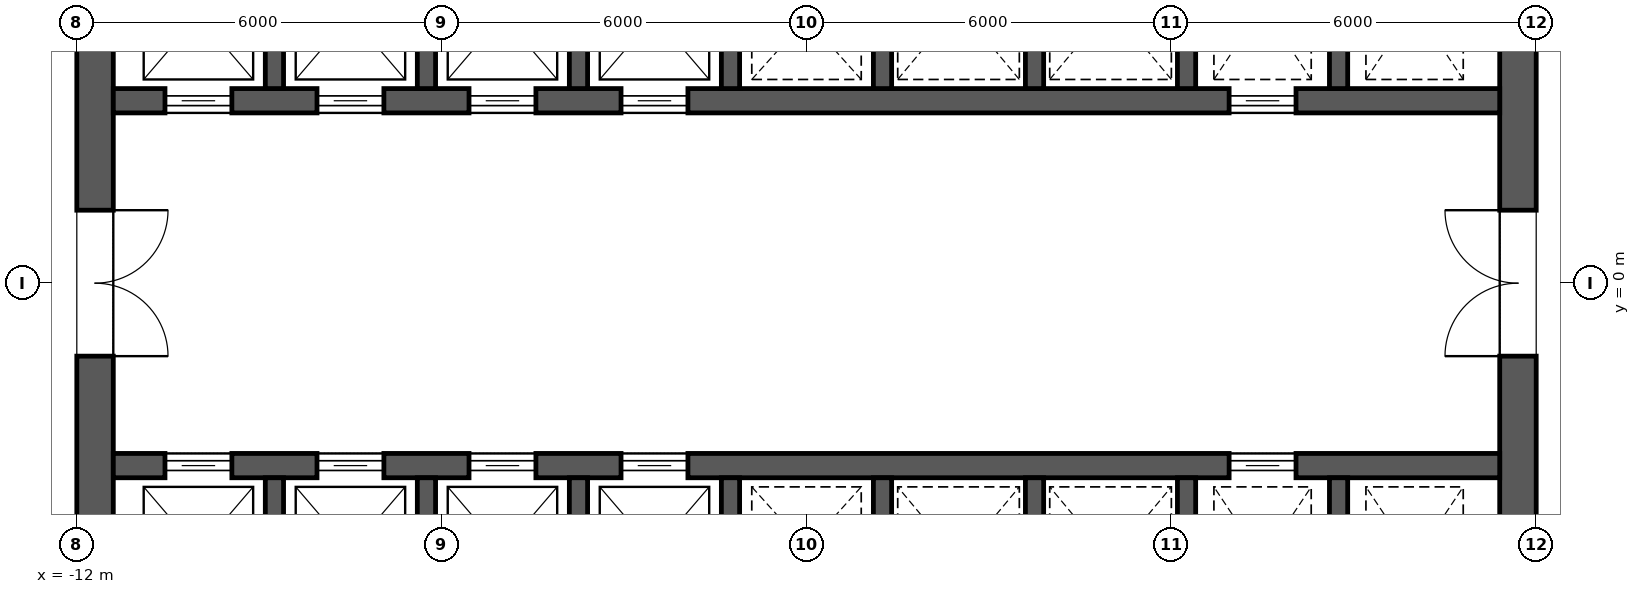
"""IFC4 building model, lengths in metres.
Left out: names, types, materials, properties, quantities, classifications, styles, units other than length and angle.
Written with IfcOpenShell. Run it as: python <this file> out.ifc"""

import sys

from ifc_helpers import new_model, si_unit, direction, frame, frame_2d, origin, place, context, subcontext, project, spatial, rectangle, extrude, element, fill, save


model = new_model("IFC4")
c1 = context("Model", 3, precision=1e-05, world=origin(), true_north=direction((0.0, 1.0)))
c2 = subcontext(c1, "Body", "Model", "MODEL_VIEW")
j1 = project(units=[si_unit("LENGTHUNIT", "METRE"), si_unit("PLANEANGLEUNIT", "RADIAN")], contexts=[c1])
p1 = place(None, origin())
s1 = spatial("IfcSite", under=j1, at=p1, CompositionType="ELEMENT")
p2 = place(p1, origin())
s2 = spatial("IfcBuilding", under=s1, at=p2, CompositionType="ELEMENT")
p3 = place(p2, frame((0.0, 0.0, 138.1)))
s3 = spatial("IfcBuildingStorey", under=s2, at=p3, CompositionType="ELEMENT", Elevation=138.1)
p4 = place(p3, frame((11.7, -11.4, 0.0), z_axis=(0.0, 0.0, 1.0), x_axis=(0.0, 1.0, 0.0)))
e1 = element("IfcWall", 1, at=p4, inside=s3, PredefinedType="SHEAR", context=c2, shape_type="SweptSolid", body=[
    extrude(rectangle(XDim=22.8, YDim=0.6, at=frame_2d((11.4, 0.0))), origin(), (0.0, 0.0, 1.0), 4.2),
])
p5 = place(p4, frame((10.2, 0.0, 0.0)))
e2 = element("IfcOpeningElement", 2, at=p5, cuts=e1, PredefinedType="OPENING", context=c2, shape_type="SweptSolid", body=[
    extrude(rectangle(XDim=2.4, YDim=2.1, at=frame_2d((1.2, 1.05))), frame((0.0, 0.312, 0.0), z_axis=(0.0, -1.0, 0.0), x_axis=(1.0, 0.0, 0.0)), (0.0, 0.0, 1.0), 0.624),
])
p6 = place(p4, frame((19.5, 0.0, 0.0)))
e3 = element("IfcOpeningElement", 3, at=p6, cuts=e1, PredefinedType="OPENING", context=c2, shape_type="SweptSolid", body=[
    extrude(rectangle(XDim=1.2, YDim=2.1, at=frame_2d((0.6, 1.05))), frame((0.0, 0.312, 0.0), z_axis=(0.0, -1.0, 0.0), x_axis=(1.0, 0.0, 0.0)), (0.0, 0.0, 1.0), 0.624),
])
p7 = place(p4, frame((2.1, 0.0, 0.0)))
e4 = element("IfcOpeningElement", 4, at=p7, cuts=e1, PredefinedType="OPENING", context=c2, shape_type="SweptSolid", body=[
    extrude(rectangle(XDim=1.2, YDim=2.1, at=frame_2d((0.6, 1.05))), frame((0.0, 0.312, 0.0), z_axis=(0.0, -1.0, 0.0), x_axis=(1.0, 0.0, 0.0)), (0.0, 0.0, 1.0), 0.624),
])
p8 = place(p3, frame((-11.7, -11.4, 0.0), z_axis=(0.0, 0.0, 1.0), x_axis=(0.0, 1.0, 0.0)))
e5 = element("IfcWall", 5, at=p8, inside=s3, PredefinedType="SHEAR", context=c2, shape_type="SweptSolid", body=[
    extrude(rectangle(XDim=22.8, YDim=0.6, at=frame_2d((11.4, 0.0))), origin(), (0.0, 0.0, 1.0), 4.2),
])
p9 = place(p8, frame((10.2, 0.0, 0.0)))
e6 = element("IfcOpeningElement", 6, at=p9, cuts=e5, PredefinedType="OPENING", context=c2, shape_type="SweptSolid", body=[
    extrude(rectangle(XDim=2.4, YDim=2.1, at=frame_2d((1.2, 1.05))), frame((0.0, 0.312, 0.0), z_axis=(0.0, -1.0, 0.0), x_axis=(1.0, 0.0, 0.0)), (0.0, 0.0, 1.0), 0.624),
])
p10 = place(p8, frame((18.925, 0.0, 0.0)))
e7 = element("IfcOpeningElement", 7, at=p10, cuts=e5, PredefinedType="OPENING", context=c2, shape_type="SweptSolid", body=[
    extrude(rectangle(XDim=1.2, YDim=2.1, at=frame_2d((0.6, 1.05))), frame((0.0, 0.312, 0.0), z_axis=(0.0, -1.0, 0.0), x_axis=(1.0, 0.0, 0.0)), (0.0, 0.0, 1.0), 0.624),
])
p11 = place(p8, frame((2.675, 0.0, 0.0)))
e8 = element("IfcOpeningElement", 8, at=p11, cuts=e5, PredefinedType="OPENING", context=c2, shape_type="SweptSolid", body=[
    extrude(rectangle(XDim=1.2, YDim=2.1, at=frame_2d((0.6, 1.05))), frame((0.0, 0.312, 0.0), z_axis=(0.0, -1.0, 0.0), x_axis=(1.0, 0.0, 0.0)), (0.0, 0.0, 1.0), 0.624),
])
p12 = place(p3, frame((-11.4, 3.0, 0.0), z_axis=(0.0, 0.0, 1.0), x_axis=(1.0, 0.0, 0.0)))
e9 = element("IfcWall", 9, at=p12, inside=s3, PredefinedType="SHEAR", context=c2, shape_type="SweptSolid", body=[
    extrude(rectangle(XDim=22.8, YDim=0.4, at=frame_2d((11.4, 0.0))), origin(), (0.0, 0.0, 1.0), 4.2),
])
p13 = place(p12, frame((0.85, 0.0, 0.0)))
e10 = element("IfcOpeningElement", 10, at=p13, cuts=e9, PredefinedType="OPENING", context=c2, shape_type="SweptSolid", body=[
    extrude(rectangle(XDim=1.1, YDim=2.1, at=frame_2d((0.55, 1.05))), frame((0.0, 0.212, 0.0), z_axis=(0.0, -1.0, 0.0), x_axis=(1.0, 0.0, 0.0)), (0.0, 0.0, 1.0), 0.424),
])
p14 = place(p12, frame((3.35, 0.0, 0.0)))
e11 = element("IfcOpeningElement", 11, at=p14, cuts=e9, PredefinedType="OPENING", context=c2, shape_type="SweptSolid", body=[
    extrude(rectangle(XDim=1.1, YDim=2.1, at=frame_2d((0.55, 1.05))), frame((0.0, 0.212, 0.0), z_axis=(0.0, -1.0, 0.0), x_axis=(1.0, 0.0, 0.0)), (0.0, 0.0, 1.0), 0.424),
])
p15 = place(p12, frame((5.85, 0.0, 0.0)))
e12 = element("IfcOpeningElement", 12, at=p15, cuts=e9, PredefinedType="OPENING", context=c2, shape_type="SweptSolid", body=[
    extrude(rectangle(XDim=1.1, YDim=2.1, at=frame_2d((0.55, 1.05))), frame((0.0, 0.212, 0.0), z_axis=(0.0, -1.0, 0.0), x_axis=(1.0, 0.0, 0.0)), (0.0, 0.0, 1.0), 0.424),
])
p16 = place(p12, frame((8.35, 0.0, 0.0)))
e13 = element("IfcOpeningElement", 13, at=p16, cuts=e9, PredefinedType="OPENING", context=c2, shape_type="SweptSolid", body=[
    extrude(rectangle(XDim=1.1, YDim=2.1, at=frame_2d((0.55, 1.05))), frame((0.0, 0.212, 0.0), z_axis=(0.0, -1.0, 0.0), x_axis=(1.0, 0.0, 0.0)), (0.0, 0.0, 1.0), 0.424),
])
p17 = place(p12, frame((18.35, 0.0, 0.0)))
e14 = element("IfcOpeningElement", 14, at=p17, cuts=e9, PredefinedType="OPENING", context=c2, shape_type="SweptSolid", body=[
    extrude(rectangle(XDim=1.1, YDim=2.1, at=frame_2d((0.55, 1.05))), frame((0.0, 0.212, 0.0), z_axis=(0.0, -1.0, 0.0), x_axis=(1.0, 0.0, 0.0)), (0.0, 0.0, 1.0), 0.424),
])
for number, where, z_axis, x_axis in (
    (15, (-8.75, 3.2, 0.0), (0.0, 0.0, 1.0), (0.0, 1.0, 0.0)),
    (16, (-6.25, 3.2, 0.0), (0.0, 0.0, 1.0), (0.0, 1.0, 0.0)),
    (17, (-3.75, 3.2, 0.0), (0.0, 0.0, 1.0), (0.0, 1.0, 0.0)),
    (18, (-1.25, 3.2, 0.0), (0.0, 0.0, 1.0), (0.0, 1.0, 0.0)),
    (19, (1.25, 3.2, 0.0), (0.0, 0.0, 1.0), (0.0, 1.0, 0.0)),
    (20, (3.75, 3.2, 0.0), (0.0, 0.0, 1.0), (0.0, 1.0, 0.0)),
    (21, (6.25, 3.2, 0.0), (0.0, 0.0, 1.0), (0.0, 1.0, 0.0)),
    (22, (8.75, 3.2, 0.0), (0.0, 0.0, 1.0), (0.0, 1.0, 0.0)),
):
    element("IfcWall", number, at=place(p3, frame(where, z_axis=z_axis, x_axis=x_axis)), inside=s3, PredefinedType="SHEAR", context=c2, shape_type="SweptSolid", body=[
        extrude(rectangle(XDim=2.9, YDim=0.3, at=frame_2d((1.45, 0.0))), origin(), (0.0, 0.0, 1.0), 4.2),
    ])
p18 = place(p3, frame((-11.4, -3.0, 0.0), z_axis=(0.0, 0.0, 1.0), x_axis=(1.0, 0.0, 0.0)))
e23 = element("IfcWall", 23, at=p18, inside=s3, PredefinedType="SHEAR", context=c2, shape_type="SweptSolid", body=[
    extrude(rectangle(XDim=22.8, YDim=0.4, at=frame_2d((11.4, 0.0))), origin(), (0.0, 0.0, 1.0), 4.2),
])
p19 = place(p18, frame((0.85, 0.0, 0.0)))
e24 = element("IfcOpeningElement", 24, at=p19, cuts=e23, PredefinedType="OPENING", context=c2, shape_type="SweptSolid", body=[
    extrude(rectangle(XDim=1.1, YDim=2.1, at=frame_2d((0.55, 1.05))), frame((0.0, 0.212, 0.0), z_axis=(0.0, -1.0, 0.0), x_axis=(1.0, 0.0, 0.0)), (0.0, 0.0, 1.0), 0.424),
])
p20 = place(p18, frame((3.35, 0.0, 0.0)))
e25 = element("IfcOpeningElement", 25, at=p20, cuts=e23, PredefinedType="OPENING", context=c2, shape_type="SweptSolid", body=[
    extrude(rectangle(XDim=1.1, YDim=2.1, at=frame_2d((0.55, 1.05))), frame((0.0, 0.212, 0.0), z_axis=(0.0, -1.0, 0.0), x_axis=(1.0, 0.0, 0.0)), (0.0, 0.0, 1.0), 0.424),
])
p21 = place(p18, frame((5.85, 0.0, 0.0)))
e26 = element("IfcOpeningElement", 26, at=p21, cuts=e23, PredefinedType="OPENING", context=c2, shape_type="SweptSolid", body=[
    extrude(rectangle(XDim=1.1, YDim=2.1, at=frame_2d((0.55, 1.05))), frame((0.0, 0.212, 0.0), z_axis=(0.0, -1.0, 0.0), x_axis=(1.0, 0.0, 0.0)), (0.0, 0.0, 1.0), 0.424),
])
p22 = place(p18, frame((8.35, 0.0, 0.0)))
e27 = element("IfcOpeningElement", 27, at=p22, cuts=e23, PredefinedType="OPENING", context=c2, shape_type="SweptSolid", body=[
    extrude(rectangle(XDim=1.1, YDim=2.1, at=frame_2d((0.55, 1.05))), frame((0.0, 0.212, 0.0), z_axis=(0.0, -1.0, 0.0), x_axis=(1.0, 0.0, 0.0)), (0.0, 0.0, 1.0), 0.424),
])
p23 = place(p18, frame((18.35, 0.0, 0.0)))
e28 = element("IfcOpeningElement", 28, at=p23, cuts=e23, PredefinedType="OPENING", context=c2, shape_type="SweptSolid", body=[
    extrude(rectangle(XDim=1.1, YDim=2.1, at=frame_2d((0.55, 1.05))), frame((0.0, 0.212, 0.0), z_axis=(0.0, -1.0, 0.0), x_axis=(1.0, 0.0, 0.0)), (0.0, 0.0, 1.0), 0.424),
])
for number, where, z_axis, x_axis in (
    (29, (-8.75, -6.1, 0.0), (0.0, 0.0, 1.0), (0.0, 1.0, 0.0)),
    (30, (-6.25, -6.1, 0.0), (0.0, 0.0, 1.0), (0.0, 1.0, 0.0)),
    (31, (-3.75, -6.1, 0.0), (0.0, 0.0, 1.0), (0.0, 1.0, 0.0)),
    (32, (-1.25, -6.1, 0.0), (0.0, 0.0, 1.0), (0.0, 1.0, 0.0)),
    (33, (1.25, -6.1, 0.0), (0.0, 0.0, 1.0), (0.0, 1.0, 0.0)),
    (34, (3.75, -6.1, 0.0), (0.0, 0.0, 1.0), (0.0, 1.0, 0.0)),
    (35, (6.25, -6.1, 0.0), (0.0, 0.0, 1.0), (0.0, 1.0, 0.0)),
    (36, (8.75, -6.1, 0.0), (0.0, 0.0, 1.0), (0.0, 1.0, 0.0)),
):
    element("IfcWall", number, at=place(p3, frame(where, z_axis=z_axis, x_axis=x_axis)), inside=s3, PredefinedType="SHEAR", context=c2, shape_type="SweptSolid", body=[
        extrude(rectangle(XDim=2.9, YDim=0.3, at=frame_2d((1.45, 0.0))), origin(), (0.0, 0.0, 1.0), 4.2),
    ])
p24 = place(p13, origin())
e37 = element("IfcDoor", 37, at=p24, inside=s3, OperationType="SLIDING_TO_LEFT", PredefinedType="DOOR", context=c2, shape_type="SweptSolid", body=[
    extrude(rectangle(XDim=1.1, YDim=2.1, at=frame_2d((0.55, 1.05))), frame((0.0, 0.025, 0.0), z_axis=(0.0, -1.0, 0.0), x_axis=(1.0, 0.0, 0.0)), (0.0, 0.0, 1.0), 0.05),
])
fill(e10, e37)
p25 = place(p14, origin())
e38 = element("IfcDoor", 38, at=p25, inside=s3, OperationType="SLIDING_TO_LEFT", PredefinedType="DOOR", context=c2, shape_type="SweptSolid", body=[
    extrude(rectangle(XDim=1.1, YDim=2.1, at=frame_2d((0.55, 1.05))), frame((0.0, 0.025, 0.0), z_axis=(0.0, -1.0, 0.0), x_axis=(1.0, 0.0, 0.0)), (0.0, 0.0, 1.0), 0.05),
])
fill(e11, e38)
p26 = place(p15, origin())
e39 = element("IfcDoor", 39, at=p26, inside=s3, OperationType="SLIDING_TO_LEFT", PredefinedType="DOOR", context=c2, shape_type="SweptSolid", body=[
    extrude(rectangle(XDim=1.1, YDim=2.1, at=frame_2d((0.55, 1.05))), frame((0.0, 0.025, 0.0), z_axis=(0.0, -1.0, 0.0), x_axis=(1.0, 0.0, 0.0)), (0.0, 0.0, 1.0), 0.05),
])
fill(e12, e39)
p27 = place(p16, origin())
e40 = element("IfcDoor", 40, at=p27, inside=s3, OperationType="SLIDING_TO_LEFT", PredefinedType="DOOR", context=c2, shape_type="SweptSolid", body=[
    extrude(rectangle(XDim=1.1, YDim=2.1, at=frame_2d((0.55, 1.05))), frame((0.0, 0.025, 0.0), z_axis=(0.0, -1.0, 0.0), x_axis=(1.0, 0.0, 0.0)), (0.0, 0.0, 1.0), 0.05),
])
fill(e13, e40)
p28 = place(p19, origin())
e41 = element("IfcDoor", 41, at=p28, inside=s3, OperationType="SLIDING_TO_LEFT", PredefinedType="DOOR", context=c2, shape_type="SweptSolid", body=[
    extrude(rectangle(XDim=1.1, YDim=2.1, at=frame_2d((0.55, 1.05))), frame((0.0, 0.025, 0.0), z_axis=(0.0, -1.0, 0.0), x_axis=(1.0, 0.0, 0.0)), (0.0, 0.0, 1.0), 0.05),
])
fill(e24, e41)
p29 = place(p20, origin())
e42 = element("IfcDoor", 42, at=p29, inside=s3, OperationType="SLIDING_TO_LEFT", PredefinedType="DOOR", context=c2, shape_type="SweptSolid", body=[
    extrude(rectangle(XDim=1.1, YDim=2.1, at=frame_2d((0.55, 1.05))), frame((0.0, 0.025, 0.0), z_axis=(0.0, -1.0, 0.0), x_axis=(1.0, 0.0, 0.0)), (0.0, 0.0, 1.0), 0.05),
])
fill(e25, e42)
p30 = place(p21, origin())
e43 = element("IfcDoor", 43, at=p30, inside=s3, OperationType="SLIDING_TO_LEFT", PredefinedType="DOOR", context=c2, shape_type="SweptSolid", body=[
    extrude(rectangle(XDim=1.1, YDim=2.1, at=frame_2d((0.55, 1.05))), frame((0.0, 0.025, 0.0), z_axis=(0.0, -1.0, 0.0), x_axis=(1.0, 0.0, 0.0)), (0.0, 0.0, 1.0), 0.05),
])
fill(e26, e43)
p31 = place(p22, origin())
e44 = element("IfcDoor", 44, at=p31, inside=s3, OperationType="SLIDING_TO_LEFT", PredefinedType="DOOR", context=c2, shape_type="SweptSolid", body=[
    extrude(rectangle(XDim=1.1, YDim=2.1, at=frame_2d((0.55, 1.05))), frame((0.0, 0.025, 0.0), z_axis=(0.0, -1.0, 0.0), x_axis=(1.0, 0.0, 0.0)), (0.0, 0.0, 1.0), 0.05),
])
fill(e27, e44)
p32 = place(p17, origin())
e45 = element("IfcDoor", 45, at=p32, inside=s3, OperationType="SLIDING_TO_LEFT", PredefinedType="DOOR", context=c2, shape_type="SweptSolid", body=[
    extrude(rectangle(XDim=1.1, YDim=2.1, at=frame_2d((0.55, 1.05))), frame((0.0, 0.025, 0.0), z_axis=(0.0, -1.0, 0.0), x_axis=(1.0, 0.0, 0.0)), (0.0, 0.0, 1.0), 0.05),
])
fill(e14, e45)
p33 = place(p23, origin())
e46 = element("IfcDoor", 46, at=p33, inside=s3, OperationType="SLIDING_TO_LEFT", PredefinedType="DOOR", context=c2, shape_type="SweptSolid", body=[
    extrude(rectangle(XDim=1.1, YDim=2.1, at=frame_2d((0.55, 1.05))), frame((0.0, 0.025, 0.0), z_axis=(0.0, -1.0, 0.0), x_axis=(1.0, 0.0, 0.0)), (0.0, 0.0, 1.0), 0.05),
])
fill(e28, e46)
p34 = place(p9, frame((2.4, 0.0, 0.0), z_axis=(0.0, 0.0, 1.0), x_axis=(-1.0, 0.0, 0.0)))
e47 = element("IfcDoor", 47, at=p34, inside=s3, OperationType="DOUBLE_DOOR_SINGLE_SWING", PredefinedType="DOOR", context=c2, shape_type="SweptSolid", body=[
    extrude(rectangle(XDim=2.4, YDim=2.1, at=frame_2d((1.2, 1.05))), frame((0.0, 0.025, 0.0), z_axis=(0.0, -1.0, 0.0), x_axis=(1.0, 0.0, 0.0)), (0.0, 0.0, 1.0), 0.05),
])
fill(e6, e47)
p35 = place(p5, origin())
e48 = element("IfcDoor", 48, at=p35, inside=s3, OperationType="DOUBLE_DOOR_SINGLE_SWING", PredefinedType="DOOR", context=c2, shape_type="SweptSolid", body=[
    extrude(rectangle(XDim=2.4, YDim=2.1, at=frame_2d((1.2, 1.05))), frame((0.0, 0.025, 0.0), z_axis=(0.0, -1.0, 0.0), x_axis=(1.0, 0.0, 0.0)), (0.0, 0.0, 1.0), 0.05),
])
fill(e2, e48)
save(model, sys.argv[1])
